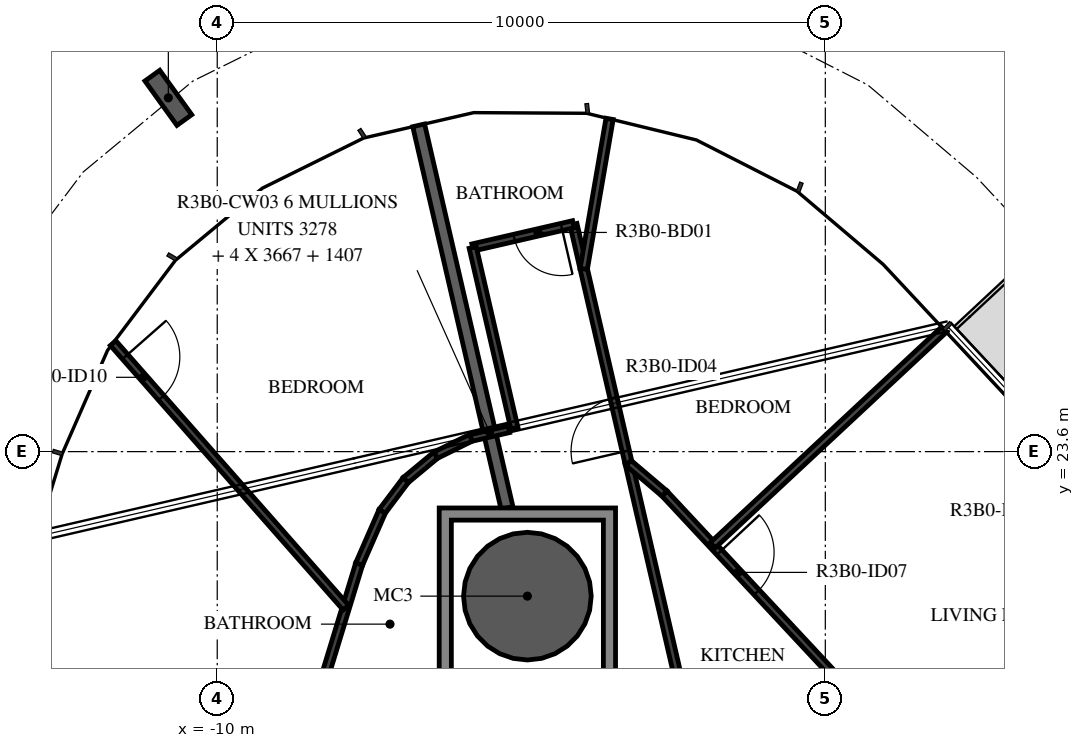
"""IFC4 building model, lengths in metres.
Left out: names, types, materials, properties, quantities, classifications, styles, units other than length and angle.
Written with IfcOpenShell. Run it as: python <this file> out.ifc"""

import sys

from ifc_helpers import new_model, si_unit, direction, frame, frame_2d, origin, origin_2d, place, context, subcontext, project, spatial, polyline, rectangle, hollow_circle, i_section, outline, extrude, element, fill, save


model = new_model("IFC4")
c1 = context("Model", 3, precision=1e-05, world=origin(), true_north=direction((0.0, 1.0)))
c2 = subcontext(c1, "Body", "Model", "MODEL_VIEW")
j1 = project(units=[si_unit("LENGTHUNIT", "METRE"), si_unit("PLANEANGLEUNIT", "RADIAN")], contexts=[c1])
p1 = place(None, origin())
s1 = spatial("IfcSite", under=j1, at=p1, CompositionType="ELEMENT")
p2 = place(p1, origin())
s2 = spatial("IfcBuilding", under=s1, at=p2, CompositionType="ELEMENT")
p3 = place(p2, frame((0.0, 0.0, 127.4)))
s3 = spatial("IfcBuildingStorey", under=s2, at=p3, CompositionType="ELEMENT", Elevation=127.4)
p4 = place(p3, frame((-4.9, 21.223, -0.38), z_axis=(0.0, 0.0, 1.0), x_axis=(1.0, 0.0, 0.0)))
e1 = element("IfcColumn", 1, at=p4, inside=s3, PredefinedType="COLUMN", context=c2, shape_type="SweptSolid", body=[
    extrude(hollow_circle(Radius=1.05, WallThickness=0.05, at=origin_2d()), origin(), (0.0, 0.0, 1.0), 3.5),
])
p5 = place(p3, frame((-10.804, 29.418, -0.38), z_axis=(0.0, 0.0, 1.0), x_axis=(0.811328097008, 0.584591069898, 0.0)))
e2 = element("IfcColumn", 2, at=p5, inside=s3, PredefinedType="COLUMN", context=c2, shape_type="SweptSolid", body=[
    extrude(i_section(OverallWidth=0.3, OverallDepth=0.9, WebThickness=0.019, FlangeThickness=0.035, FilletRadius=0.03, at=origin_2d()), origin(), (0.0, 0.0, 1.0), 3.5),
])
p6 = place(p3, frame((-6.687, 28.966, 0.0), z_axis=(0.0, 0.0, 1.0), x_axis=(0.224945100086, -0.974371439415, 0.0)))
e3 = element("IfcWall", 3, at=p6, inside=s3, PredefinedType="STANDARD", context=c2, shape_type="SweptSolid", body=[
    extrude(rectangle(XDim=6.458, YDim=0.2, at=frame_2d((3.229, 0.0))), origin(), (0.0, 0.0, 1.0), 3.12),
])
p7 = place(p3, frame((-1.36, 15.286, 0.0), z_axis=(0.0, 0.0, 1.0), x_axis=(-0.224974943676, 0.97436454919, 0.0)))
e4 = element("IfcWall", 4, at=p7, inside=s3, PredefinedType="PARTITIONING", context=c2, shape_type="SweptSolid", body=[
    extrude(rectangle(XDim=8.341, YDim=0.12, at=frame_2d((4.17, 0.0))), origin(), (0.0, 0.0, 1.0), 3.12),
])
p8 = place(p7, frame((1.441, 0.0, 0.0)))
e5 = element("IfcOpeningElement", 5, at=p8, cuts=e4, PredefinedType="OPENING", context=c2, shape_type="SweptSolid", body=[
    extrude(rectangle(XDim=0.9, YDim=2.1, at=frame_2d((0.45, 1.05))), frame((0.0, 0.07, 0.0), z_axis=(0.0, -1.0, 0.0), x_axis=(1.0, 0.0, 0.0)), (0.0, 0.0, 1.0), 0.14),
])
p9 = place(p3, frame((-3.236, 23.413, 0.0), z_axis=(0.0, 0.0, 1.0), x_axis=(-0.224934720918, 0.97437383551, 0.0)))
e6 = element("IfcWall", 6, at=p9, inside=s3, PredefinedType="PARTITIONING", context=c2, shape_type="SweptSolid", body=[
    extrude(rectangle(XDim=4.03, YDim=0.12, at=frame_2d((2.015, 0.0))), origin(), (0.0, 0.0, 1.0), 3.12),
])
p10 = place(p9, frame((0.2, 0.0, 0.0)))
e7 = element("IfcOpeningElement", 7, at=p10, cuts=e6, PredefinedType="OPENING", context=c2, shape_type="SweptSolid", body=[
    extrude(rectangle(XDim=0.9, YDim=2.1, at=frame_2d((0.45, 1.05))), frame((0.0, 0.07, 0.0), z_axis=(0.0, -1.0, 0.0), x_axis=(1.0, 0.0, 0.0)), (0.0, 0.0, 1.0), 0.14),
])
p11 = place(p3, frame((-4.143, 27.34, 0.0), z_axis=(0.0, 0.0, 1.0), x_axis=(-0.974345183359, -0.22505880046, 0.0)))
e8 = element("IfcWall", 8, at=p11, inside=s3, PredefinedType="PARTITIONING", context=c2, shape_type="SweptSolid", body=[
    extrude(rectangle(XDim=1.7, YDim=0.12, at=frame_2d((0.85, 0.0))), origin(), (0.0, 0.0, 1.0), 3.12),
])
p12 = place(p11, frame((0.2, 0.0, 0.0)))
e9 = element("IfcOpeningElement", 9, at=p12, cuts=e8, PredefinedType="OPENING", context=c2, shape_type="SweptSolid", body=[
    extrude(rectangle(XDim=0.8, YDim=2.1, at=frame_2d((0.4, 1.05))), frame((0.0, 0.07, 0.0), z_axis=(0.0, -1.0, 0.0), x_axis=(1.0, 0.0, 0.0)), (0.0, 0.0, 1.0), 0.14),
])
p13 = place(p3, frame((-5.799, 26.957, 0.0), z_axis=(0.0, 0.0, 1.0), x_axis=(0.224876960008, -0.974387167843, 0.0)))
e10 = element("IfcWall", 10, at=p13, inside=s3, PredefinedType="PARTITIONING", context=c2, shape_type="SweptSolid", body=[
    extrude(rectangle(XDim=3.065, YDim=0.12, at=frame_2d((1.532, 0.0))), origin(), (0.0, 0.0, 1.0), 3.12),
])
p14 = place(p3, frame((-5.205, 23.971, 0.0), z_axis=(0.0, 0.0, 1.0), x_axis=(-0.974410422398, -0.224776174722, 0.0)))
e11 = element("IfcWall", 11, at=p14, inside=s3, PredefinedType="PARTITIONING", context=c2, shape_type="SweptSolid", body=[
    extrude(rectangle(XDim=0.642, YDim=0.12, at=frame_2d((0.321, 0.0))), origin(), (0.0, 0.0, 1.0), 3.12),
])
p15 = place(p3, frame((-2.646, 22.912, 0.0), z_axis=(0.0, 0.0, 1.0), x_axis=(0.68200318122, -0.731349205788, 0.0)))
e12 = element("IfcWall", 12, at=p15, inside=s3, PredefinedType="PARTITIONING", context=c2, shape_type="SweptSolid", body=[
    extrude(rectangle(XDim=11.874, YDim=0.12, at=frame_2d((5.937, 0.0))), origin(), (0.0, 0.0, 1.0), 3.12),
])
p16 = place(p15, frame((5.752, 0.0, 0.0)))
e13 = element("IfcOpeningElement", 13, at=p16, cuts=e12, PredefinedType="OPENING", context=c2, shape_type="SweptSolid", body=[
    extrude(rectangle(XDim=0.9, YDim=2.1, at=frame_2d((0.45, 1.05))), frame((0.0, 0.07, 0.0), z_axis=(0.0, -1.0, 0.0), x_axis=(1.0, 0.0, 0.0)), (0.0, 0.0, 1.0), 0.14),
])
p17 = place(p15, frame((1.324, 0.0, 0.0)))
e14 = element("IfcOpeningElement", 14, at=p17, cuts=e12, PredefinedType="OPENING", context=c2, shape_type="SweptSolid", body=[
    extrude(rectangle(XDim=0.9, YDim=2.1, at=frame_2d((0.45, 1.05))), frame((0.0, 0.07, 0.0), z_axis=(0.0, -1.0, 0.0), x_axis=(1.0, 0.0, 0.0)), (0.0, 0.0, 1.0), 0.14),
])
p18 = place(p3, frame((1.951, 25.607, 0.0), z_axis=(0.0, 0.0, 1.0), x_axis=(-0.73134872518, -0.682003696601, 0.0)))
e15 = element("IfcWall", 15, at=p18, inside=s3, PredefinedType="PARTITIONING", context=c2, shape_type="SweptSolid", body=[
    extrude(rectangle(XDim=5.2, YDim=0.12, at=frame_2d((2.6, 0.0))), origin(), (0.0, 0.0, 1.0), 2.73),
])
p19 = place(p3, frame((-3.236, 23.413, 0.0), z_axis=(0.0, 0.0, 1.0), x_axis=(0.762429029489, -0.647071846855, 0.0)))
e16 = element("IfcWall", 16, at=p19, inside=s3, PredefinedType="PARTITIONING", context=c2, shape_type="SweptSolid", body=[
    extrude(rectangle(XDim=0.775, YDim=0.12, at=frame_2d((0.387, 0.0))), origin(), (0.0, 0.0, 1.0), 3.12),
])
p20 = place(p3, frame((-3.548, 29.072, 0.0), z_axis=(0.0, 0.0, 1.0), x_axis=(-0.169756715849, -0.985486000623, 0.0)))
e17 = element("IfcWall", 17, at=p20, inside=s3, PredefinedType="PARTITIONING", context=c2, shape_type="SweptSolid", body=[
    extrude(rectangle(XDim=2.504, YDim=0.12, at=frame_2d((1.252, 0.0))), origin(), (0.0, 0.0, 1.0), 2.73),
])
p21 = place(p3, frame((-10.354, 12.961, 0.0), z_axis=(0.0, 0.0, 1.0), x_axis=(0.292379778045, 0.956302287663, 0.0)))
e18 = element("IfcWall", 18, at=p21, inside=s3, PredefinedType="PARTITIONING", context=c2, shape_type="SweptSolid", body=[
    extrude(rectangle(XDim=9.194, YDim=0.12, at=frame_2d((4.597, 0.0))), origin(), (0.0, 0.0, 1.0), 3.12),
])
p22 = place(p21, frame((0.2, 0.0, 0.0)))
e19 = element("IfcOpeningElement", 19, at=p22, cuts=e18, PredefinedType="OPENING", context=c2, shape_type="SweptSolid", body=[
    extrude(rectangle(XDim=0.9, YDim=2.1, at=frame_2d((0.45, 1.05))), frame((0.0, 0.07, 0.0), z_axis=(0.0, -1.0, 0.0), x_axis=(1.0, 0.0, 0.0)), (0.0, 0.0, 1.0), 0.14),
])
p23 = place(p3, frame((-7.666, 21.753, 0.0), z_axis=(0.0, 0.0, 1.0), x_axis=(0.401562829944, 0.915831476642, 0.0)))
e20 = element("IfcWall", 20, at=p23, inside=s3, PredefinedType="PARTITIONING", context=c2, shape_type="SweptSolid", body=[
    extrude(rectangle(XDim=0.947, YDim=0.12, at=frame_2d((0.473, 0.0))), origin(), (0.0, 0.0, 1.0), 3.12),
])
p24 = place(p3, frame((-7.286, 22.62, 0.0), z_axis=(0.0, 0.0, 1.0), x_axis=(0.601702575527, 0.798720233, 0.0)))
e21 = element("IfcWall", 21, at=p24, inside=s3, PredefinedType="PARTITIONING", context=c2, shape_type="SweptSolid", body=[
    extrude(rectangle(XDim=0.642, YDim=0.12, at=frame_2d((0.321, 0.0))), origin(), (0.0, 0.0, 1.0), 3.12),
])
p25 = place(p3, frame((-6.9, 23.132, 0.0), z_axis=(0.0, 0.0, 1.0), x_axis=(0.769653132962, 0.638462258025, 0.0)))
e22 = element("IfcWall", 22, at=p25, inside=s3, PredefinedType="PARTITIONING", context=c2, shape_type="SweptSolid", body=[
    extrude(rectangle(XDim=0.642, YDim=0.12, at=frame_2d((0.321, 0.0))), origin(), (0.0, 0.0, 1.0), 3.12),
])
p26 = place(p3, frame((-6.406, 23.542, 0.0), z_axis=(0.0, 0.0, 1.0), x_axis=(0.896245703043, 0.44355793283, 0.0)))
e23 = element("IfcWall", 23, at=p26, inside=s3, PredefinedType="PARTITIONING", context=c2, shape_type="SweptSolid", body=[
    extrude(rectangle(XDim=0.642, YDim=0.12, at=frame_2d((0.321, 0.0))), origin(), (0.0, 0.0, 1.0), 3.12),
])
p27 = place(p3, frame((-11.713, 25.385, 0.0), z_axis=(0.0, 0.0, 1.0), x_axis=(0.660694383024, -0.750655002142, 0.0)))
e24 = element("IfcWall", 24, at=p27, inside=s3, PredefinedType="PARTITIONING", context=c2, shape_type="SweptSolid", body=[
    extrude(rectangle(XDim=5.794, YDim=0.12, at=frame_2d((2.897, 0.0))), origin(), (0.0, 0.0, 1.0), 3.12),
])
p28 = place(p27, frame((0.3, 0.0, 0.0)))
e25 = element("IfcOpeningElement", 25, at=p28, cuts=e24, PredefinedType="OPENING", context=c2, shape_type="SweptSolid", body=[
    extrude(rectangle(XDim=0.9, YDim=2.1, at=frame_2d((0.45, 1.05))), frame((0.0, 0.07, 0.0), z_axis=(0.0, -1.0, 0.0), x_axis=(1.0, 0.0, 0.0)), (0.0, 0.0, 1.0), 0.14),
])
p29 = place(p3, origin())
e26 = element("IfcWall", 26, at=p29, inside=s3, PredefinedType="STANDARD", context=c2, shape_type="SweptSolid", body=[
    extrude(outline(polyline([(-3.45, 22.674), (-3.45, 19.773), (-6.35, 19.773), (-6.35, 22.674), (-3.45, 22.674)]), holes=[polyline([(-6.15, 19.973), (-3.65, 19.973), (-3.65, 22.473), (-6.15, 22.473), (-6.15, 19.973)])]), origin(), (0.0, 0.0, 1.0), 3.12),
])
p30 = place(p10, origin())
e27 = element("IfcDoor", 27, at=p30, inside=s3, OperationType="SINGLE_SWING_LEFT", PredefinedType="DOOR", context=c2, shape_type="SweptSolid", body=[
    extrude(rectangle(XDim=0.9, YDim=2.1, at=frame_2d((0.45, 1.05))), frame((0.0, 0.025, 0.0), z_axis=(0.0, -1.0, 0.0), x_axis=(1.0, 0.0, 0.0)), (0.0, 0.0, 1.0), 0.05),
])
fill(e7, e27)
p31 = place(p12, origin())
e28 = element("IfcDoor", 28, at=p31, inside=s3, OperationType="SINGLE_SWING_RIGHT", PredefinedType="DOOR", context=c2, shape_type="SweptSolid", body=[
    extrude(rectangle(XDim=0.8, YDim=2.1, at=frame_2d((0.4, 1.05))), frame((0.0, 0.025, 0.0), z_axis=(0.0, -1.0, 0.0), x_axis=(1.0, 0.0, 0.0)), (0.0, 0.0, 1.0), 0.05),
])
fill(e9, e28)
p32 = place(p17, origin())
e29 = element("IfcDoor", 29, at=p32, inside=s3, OperationType="SINGLE_SWING_LEFT", PredefinedType="DOOR", context=c2, shape_type="SweptSolid", body=[
    extrude(rectangle(XDim=0.9, YDim=2.1, at=frame_2d((0.45, 1.05))), frame((0.0, 0.025, 0.0), z_axis=(0.0, -1.0, 0.0), x_axis=(1.0, 0.0, 0.0)), (0.0, 0.0, 1.0), 0.05),
])
fill(e14, e29)
p33 = place(p28, origin())
e30 = element("IfcDoor", 30, at=p33, inside=s3, OperationType="SINGLE_SWING_LEFT", PredefinedType="DOOR", context=c2, shape_type="SweptSolid", body=[
    extrude(rectangle(XDim=0.9, YDim=2.1, at=frame_2d((0.45, 1.05))), frame((0.0, 0.025, 0.0), z_axis=(0.0, -1.0, 0.0), x_axis=(1.0, 0.0, 0.0)), (0.0, 0.0, 1.0), 0.05),
])
fill(e25, e30)
save(model, sys.argv[1])
